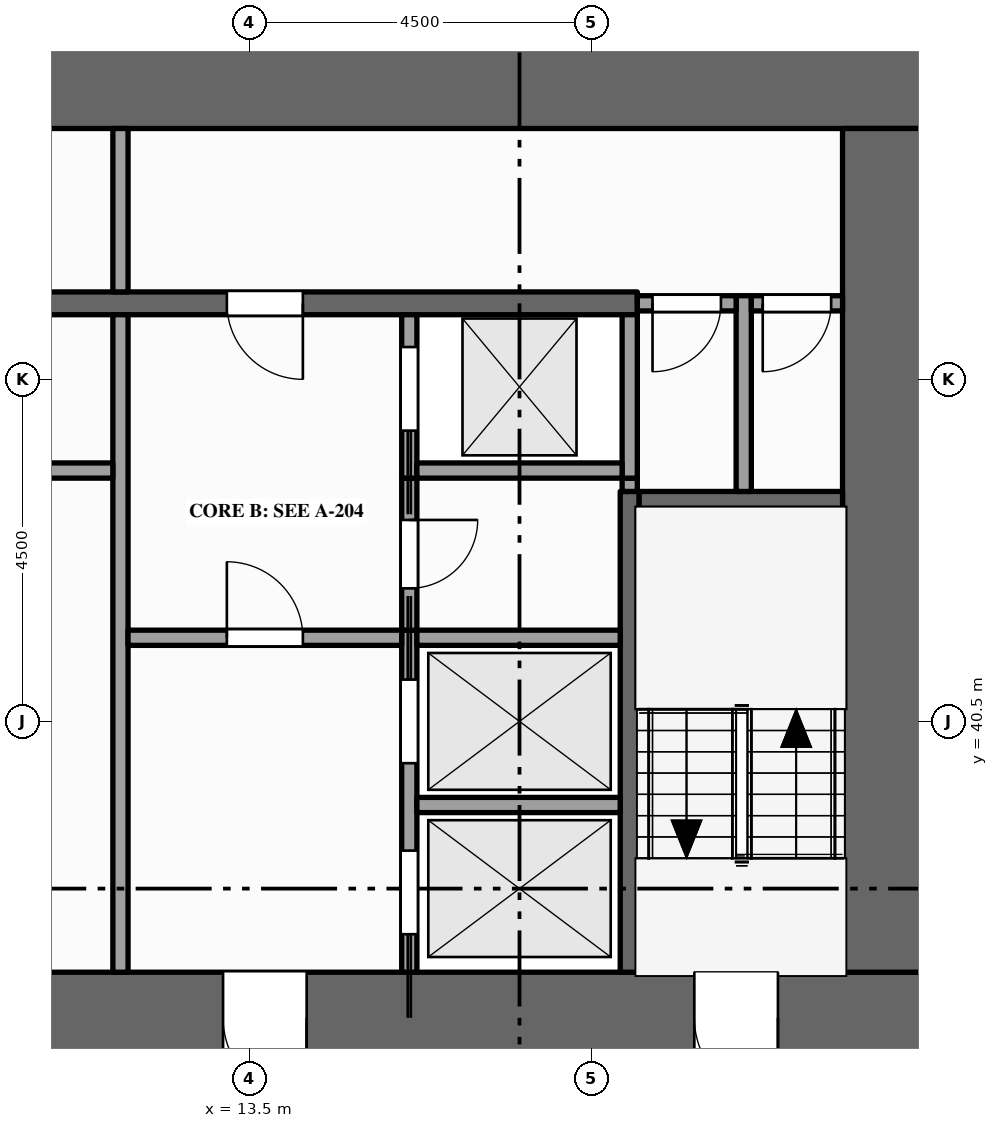
"""IFC4 building model, lengths in metres.
Left out: names, types, materials, properties, quantities, classifications, styles, units other than length and angle.
Written with IfcOpenShell. Run it as: python <this file> out.ifc"""

import sys

from ifc_helpers import new_model, si_unit, direction, frame, frame_2d, origin, place, context, subcontext, project, spatial, rectangle, extrude, element, fill, save


model = new_model("IFC4")
c1 = context("Model", 3, precision=1e-05, world=origin(), true_north=direction((0.0, 1.0)))
c2 = subcontext(c1, "Body", "Model", "MODEL_VIEW")
j1 = project(units=[si_unit("LENGTHUNIT", "METRE"), si_unit("PLANEANGLEUNIT", "RADIAN")], contexts=[c1])
p1 = place(None, origin())
s1 = spatial("IfcSite", under=j1, at=p1, CompositionType="ELEMENT")
p2 = place(p1, origin())
s2 = spatial("IfcBuilding", under=s1, at=p2, CompositionType="ELEMENT")
p3 = place(p2, frame((0.0, 0.0, 19.0)))
s3 = spatial("IfcBuildingStorey", under=s2, at=p3, CompositionType="ELEMENT", Elevation=19.0)
p4 = place(p3, frame((0.0, 36.6, -0.15), z_axis=(0.0, 0.0, 1.0), x_axis=(1.0, 0.0, 0.0)))
e1 = element("IfcWall", 1, at=p4, inside=s3, PredefinedType="SHEAR", context=c2, shape_type="SweptSolid", body=[
    extrude(rectangle(XDim=22.5, YDim=1.2, at=frame_2d((11.25, 0.0))), origin(), (0.0, 0.0, 1.0), 5.0),
])
p5 = place(p4, frame((7.1, 0.0, 0.15)))
e2 = element("IfcOpeningElement", 2, at=p5, cuts=e1, PredefinedType="OPENING", context=c2, shape_type="SweptSolid", body=[
    extrude(rectangle(XDim=1.8, YDim=2.1, at=frame_2d((0.9, 1.05))), frame((0.0, 0.61, 0.0), z_axis=(0.0, -1.0, 0.0), x_axis=(1.0, 0.0, 0.0)), (0.0, 0.0, 1.0), 1.22),
])
p6 = place(p4, frame((13.15, 0.0, 0.15)))
e3 = element("IfcOpeningElement", 3, at=p6, cuts=e1, PredefinedType="OPENING", context=c2, shape_type="SweptSolid", body=[
    extrude(rectangle(XDim=1.1, YDim=2.1, at=frame_2d((0.55, 1.05))), frame((0.0, 0.61, 0.0), z_axis=(0.0, -1.0, 0.0), x_axis=(1.0, 0.0, 0.0)), (0.0, 0.0, 1.0), 1.22),
])
p7 = place(p4, frame((2.15, 0.0, 0.15)))
e4 = element("IfcOpeningElement", 4, at=p7, cuts=e1, PredefinedType="OPENING", context=c2, shape_type="SweptSolid", body=[
    extrude(rectangle(XDim=1.1, YDim=2.1, at=frame_2d((0.55, 1.05))), frame((0.0, 0.61, 0.0), z_axis=(0.0, -1.0, 0.0), x_axis=(1.0, 0.0, 0.0)), (0.0, 0.0, 1.0), 1.22),
])
p8 = place(p4, frame((19.35, 0.0, 0.15)))
e5 = element("IfcOpeningElement", 5, at=p8, cuts=e1, PredefinedType="OPENING", context=c2, shape_type="SweptSolid", body=[
    extrude(rectangle(XDim=1.1, YDim=2.1, at=frame_2d((0.55, 1.05))), frame((0.0, 0.61, 0.0), z_axis=(0.0, -1.0, 0.0), x_axis=(1.0, 0.0, 0.0)), (0.0, 0.0, 1.0), 1.22),
])
p9 = place(p3, frame((0.0, 48.9, -0.15), z_axis=(0.0, 0.0, 1.0), x_axis=(1.0, 0.0, 0.0)))
e6 = element("IfcWall", 6, at=p9, inside=s3, PredefinedType="SHEAR", context=c2, shape_type="SweptSolid", body=[
    extrude(rectangle(XDim=22.5, YDim=1.2, at=frame_2d((11.25, 0.0))), origin(), (0.0, 0.0, 1.0), 5.0),
])
p10 = place(p3, frame((21.9, 37.2, -0.15), z_axis=(0.0, 0.0, 1.0), x_axis=(0.0, 1.0, 0.0)))
e7 = element("IfcWall", 7, at=p10, inside=s3, PredefinedType="SHEAR", context=c2, shape_type="SweptSolid", body=[
    extrude(rectangle(XDim=11.1, YDim=1.2, at=frame_2d((5.55, 0.0))), origin(), (0.0, 0.0, 1.0), 5.0),
])
p11 = place(p3, frame((11.8, 37.2, 0.0), z_axis=(0.0, 0.0, 1.0), x_axis=(0.0, 1.0, 0.0)))
e8 = element("IfcWall", 8, at=p11, inside=s3, PredefinedType="PARTITIONING", context=c2, shape_type="SweptSolid", body=[
    extrude(rectangle(XDim=8.65, YDim=0.2, at=frame_2d((4.325, 0.0))), origin(), (0.0, 0.0, 1.0), 4.75),
])
p12 = place(p3, frame((11.8, 46.15, 0.0), z_axis=(0.0, 0.0, 1.0), x_axis=(0.0, 1.0, 0.0)))
e9 = element("IfcWall", 9, at=p12, inside=s3, PredefinedType="PARTITIONING", context=c2, shape_type="SweptSolid", body=[
    extrude(rectangle(XDim=2.15, YDim=0.2, at=frame_2d((1.075, 0.0))), origin(), (0.0, 0.0, 1.0), 4.75),
])
p13 = place(p3, frame((15.6, 37.2, 0.0), z_axis=(0.0, 0.0, 1.0), x_axis=(0.0, 1.0, 0.0)))
e10 = element("IfcWall", 10, at=p13, inside=s3, PredefinedType="SOLIDWALL", context=c2, shape_type="SweptSolid", body=[
    extrude(rectangle(XDim=4.5, YDim=0.2, at=frame_2d((2.25, 0.0))), origin(), (0.0, 0.0, 1.0), 4.75),
])
p14 = place(p13, frame((0.5, 0.0, 0.012)))
e11 = element("IfcOpeningElement", 11, at=p14, cuts=e10, PredefinedType="OPENING", context=c2, shape_type="SweptSolid", body=[
    extrude(rectangle(XDim=1.1, YDim=2.1, at=frame_2d((0.55, 1.05))), frame((0.0, 0.11, 0.0), z_axis=(0.0, -1.0, 0.0), x_axis=(1.0, 0.0, 0.0)), (0.0, 0.0, 1.0), 0.22),
])
p15 = place(p13, frame((2.75, 0.0, 0.012)))
e12 = element("IfcOpeningElement", 12, at=p15, cuts=e10, PredefinedType="OPENING", context=c2, shape_type="SweptSolid", body=[
    extrude(rectangle(XDim=1.1, YDim=2.1, at=frame_2d((0.55, 1.05))), frame((0.0, 0.11, 0.0), z_axis=(0.0, -1.0, 0.0), x_axis=(1.0, 0.0, 0.0)), (0.0, 0.0, 1.0), 0.22),
])
p16 = place(p3, frame((15.6, 41.7, 0.0), z_axis=(0.0, 0.0, 1.0), x_axis=(0.0, 1.0, 0.0)))
e13 = element("IfcWall", 13, at=p16, inside=s3, PredefinedType="PARTITIONING", context=c2, shape_type="SweptSolid", body=[
    extrude(rectangle(XDim=2.0, YDim=0.2, at=frame_2d((1.0, 0.0))), origin(), (0.0, 0.0, 1.0), 4.75),
])
p17 = place(p16, frame((0.55, 0.0, 0.0)))
e14 = element("IfcOpeningElement", 14, at=p17, cuts=e13, PredefinedType="OPENING", context=c2, shape_type="SweptSolid", body=[
    extrude(rectangle(XDim=0.9, YDim=2.1, at=frame_2d((0.45, 1.05))), frame((0.0, 0.11, 0.0), z_axis=(0.0, -1.0, 0.0), x_axis=(1.0, 0.0, 0.0)), (0.0, 0.0, 1.0), 0.22),
])
p18 = place(p3, frame((15.6, 43.7, 0.0), z_axis=(0.0, 0.0, 1.0), x_axis=(0.0, 1.0, 0.0)))
e15 = element("IfcWall", 15, at=p18, inside=s3, PredefinedType="SOLIDWALL", context=c2, shape_type="SweptSolid", body=[
    extrude(rectangle(XDim=2.15, YDim=0.2, at=frame_2d((1.075, 0.0))), origin(), (0.0, 0.0, 1.0), 4.75),
])
p19 = place(p18, frame((0.625, 0.0, 0.012)))
e16 = element("IfcOpeningElement", 16, at=p19, cuts=e15, PredefinedType="OPENING", context=c2, shape_type="SweptSolid", body=[
    extrude(rectangle(XDim=1.1, YDim=2.1, at=frame_2d((0.55, 1.05))), frame((0.0, 0.11, 0.0), z_axis=(0.0, -1.0, 0.0), x_axis=(1.0, 0.0, 0.0)), (0.0, 0.0, 1.0), 0.22),
])
p20 = place(p3, frame((18.5, 37.2, 0.0), z_axis=(0.0, 0.0, 1.0), x_axis=(0.0, 1.0, 0.0)))
e17 = element("IfcWall", 17, at=p20, inside=s3, PredefinedType="SHEAR", context=c2, shape_type="SweptSolid", body=[
    extrude(rectangle(XDim=6.325, YDim=0.25, at=frame_2d((3.163, 0.0))), origin(), (0.0, 0.0, 1.0), 4.75),
])
p21 = place(p3, frame((18.5, 43.525, 0.0), z_axis=(0.0, 0.0, 1.0), x_axis=(0.0, 1.0, 0.0)))
e18 = element("IfcWall", 18, at=p21, inside=s3, PredefinedType="PARTITIONING", context=c2, shape_type="SweptSolid", body=[
    extrude(rectangle(XDim=0.175, YDim=0.2, at=frame_2d((0.087, 0.0))), origin(), (0.0, 0.0, 1.0), 4.75),
])
p22 = place(p3, frame((18.5, 43.7, 0.0), z_axis=(0.0, 0.0, 1.0), x_axis=(0.0, 1.0, 0.0)))
e19 = element("IfcWall", 19, at=p22, inside=s3, PredefinedType="SOLIDWALL", context=c2, shape_type="SweptSolid", body=[
    extrude(rectangle(XDim=2.15, YDim=0.2, at=frame_2d((1.075, 0.0))), origin(), (0.0, 0.0, 1.0), 4.75),
])
p23 = place(p3, frame((20.0, 43.525, 0.0), z_axis=(0.0, 0.0, 1.0), x_axis=(0.0, 1.0, 0.0)))
e20 = element("IfcWall", 20, at=p23, inside=s3, PredefinedType="PARTITIONING", context=c2, shape_type="SweptSolid", body=[
    extrude(rectangle(XDim=2.575, YDim=0.2, at=frame_2d((1.288, 0.0))), origin(), (0.0, 0.0, 1.0), 4.75),
])
p24 = place(p3, frame((15.7, 39.4, 0.0), z_axis=(0.0, 0.0, 1.0), x_axis=(1.0, 0.0, 0.0)))
e21 = element("IfcWall", 21, at=p24, inside=s3, PredefinedType="SOLIDWALL", context=c2, shape_type="SweptSolid", body=[
    extrude(rectangle(XDim=2.675, YDim=0.2, at=frame_2d((1.337, 0.0))), origin(), (0.0, 0.0, 1.0), 4.75),
])
p25 = place(p3, frame((11.9, 41.6, 0.0), z_axis=(0.0, 0.0, 1.0), x_axis=(1.0, 0.0, 0.0)))
e22 = element("IfcWall", 22, at=p25, inside=s3, PredefinedType="PARTITIONING", context=c2, shape_type="SweptSolid", body=[
    extrude(rectangle(XDim=3.6, YDim=0.2, at=frame_2d((1.8, 0.0))), origin(), (0.0, 0.0, 1.0), 4.75),
])
p26 = place(p25, frame((1.3, 0.0, 0.0)))
e23 = element("IfcOpeningElement", 23, at=p26, cuts=e22, PredefinedType="OPENING", context=c2, shape_type="SweptSolid", body=[
    extrude(rectangle(XDim=1.0, YDim=2.1, at=frame_2d((0.5, 1.05))), frame((0.0, 0.11, 0.0), z_axis=(0.0, -1.0, 0.0), x_axis=(1.0, 0.0, 0.0)), (0.0, 0.0, 1.0), 0.22),
])
p27 = place(p3, frame((15.7, 41.6, 0.0), z_axis=(0.0, 0.0, 1.0), x_axis=(1.0, 0.0, 0.0)))
e24 = element("IfcWall", 24, at=p27, inside=s3, PredefinedType="SOLIDWALL", context=c2, shape_type="SweptSolid", body=[
    extrude(rectangle(XDim=2.675, YDim=0.2, at=frame_2d((1.337, 0.0))), origin(), (0.0, 0.0, 1.0), 4.75),
])
p28 = place(p3, frame((18.625, 43.4, 0.0), z_axis=(0.0, 0.0, 1.0), x_axis=(1.0, 0.0, 0.0)))
e25 = element("IfcWall", 25, at=p28, inside=s3, PredefinedType="SHEAR", context=c2, shape_type="SweptSolid", body=[
    extrude(rectangle(XDim=2.675, YDim=0.25, at=frame_2d((1.337, 0.0))), origin(), (0.0, 0.0, 1.0), 4.75),
])
p29 = place(p3, frame((9.5, 43.8, 0.0), z_axis=(0.0, 0.0, 1.0), x_axis=(1.0, 0.0, 0.0)))
e26 = element("IfcWall", 26, at=p29, inside=s3, PredefinedType="PARTITIONING", context=c2, shape_type="SweptSolid", body=[
    extrude(rectangle(XDim=2.2, YDim=0.2, at=frame_2d((1.1, 0.0))), origin(), (0.0, 0.0, 1.0), 4.75),
])
p30 = place(p3, frame((15.7, 43.8, 0.0), z_axis=(0.0, 0.0, 1.0), x_axis=(1.0, 0.0, 0.0)))
e27 = element("IfcWall", 27, at=p30, inside=s3, PredefinedType="SOLIDWALL", context=c2, shape_type="SweptSolid", body=[
    extrude(rectangle(XDim=2.7, YDim=0.2, at=frame_2d((1.35, 0.0))), origin(), (0.0, 0.0, 1.0), 4.75),
])
p31 = place(p3, frame((4.1, 46.0, 0.0), z_axis=(0.0, 0.0, 1.0), x_axis=(1.0, 0.0, 0.0)))
e28 = element("IfcWall", 28, at=p31, inside=s3, PredefinedType="SHEAR", context=c2, shape_type="SweptSolid", body=[
    extrude(rectangle(XDim=14.5, YDim=0.3, at=frame_2d((7.25, 0.0))), origin(), (0.0, 0.0, 1.0), 4.75),
])
p32 = place(p31, frame((3.4, 0.0, 0.0)))
e29 = element("IfcOpeningElement", 29, at=p32, cuts=e28, PredefinedType="OPENING", context=c2, shape_type="SweptSolid", body=[
    extrude(rectangle(XDim=1.0, YDim=2.1, at=frame_2d((0.5, 1.05))), frame((0.0, 0.16, 0.0), z_axis=(0.0, -1.0, 0.0), x_axis=(1.0, 0.0, 0.0)), (0.0, 0.0, 1.0), 0.32),
])
p33 = place(p31, frame((9.1, 0.0, 0.0)))
e30 = element("IfcOpeningElement", 30, at=p33, cuts=e28, PredefinedType="OPENING", context=c2, shape_type="SweptSolid", body=[
    extrude(rectangle(XDim=1.0, YDim=2.1, at=frame_2d((0.5, 1.05))), frame((0.0, 0.16, 0.0), z_axis=(0.0, -1.0, 0.0), x_axis=(1.0, 0.0, 0.0)), (0.0, 0.0, 1.0), 0.32),
])
p34 = place(p3, frame((18.6, 46.0, 0.0), z_axis=(0.0, 0.0, 1.0), x_axis=(1.0, 0.0, 0.0)))
e31 = element("IfcWall", 31, at=p34, inside=s3, PredefinedType="PARTITIONING", context=c2, shape_type="SweptSolid", body=[
    extrude(rectangle(XDim=1.3, YDim=0.2, at=frame_2d((0.65, 0.0))), origin(), (0.0, 0.0, 1.0), 4.75),
])
p35 = place(p34, frame((0.2, 0.0, 0.0)))
e32 = element("IfcOpeningElement", 32, at=p35, cuts=e31, PredefinedType="OPENING", context=c2, shape_type="SweptSolid", body=[
    extrude(rectangle(XDim=0.9, YDim=2.1, at=frame_2d((0.45, 1.05))), frame((0.0, 0.11, 0.0), z_axis=(0.0, -1.0, 0.0), x_axis=(1.0, 0.0, 0.0)), (0.0, 0.0, 1.0), 0.22),
])
p36 = place(p3, frame((20.1, 46.0, 0.0), z_axis=(0.0, 0.0, 1.0), x_axis=(1.0, 0.0, 0.0)))
e33 = element("IfcWall", 33, at=p36, inside=s3, PredefinedType="PARTITIONING", context=c2, shape_type="SweptSolid", body=[
    extrude(rectangle(XDim=1.2, YDim=0.2, at=frame_2d((0.6, 0.0))), origin(), (0.0, 0.0, 1.0), 4.75),
])
p37 = place(p36, frame((0.15, 0.0, 0.0)))
e34 = element("IfcOpeningElement", 34, at=p37, cuts=e33, PredefinedType="OPENING", context=c2, shape_type="SweptSolid", body=[
    extrude(rectangle(XDim=0.9, YDim=2.1, at=frame_2d((0.45, 1.05))), frame((0.0, 0.11, 0.0), z_axis=(0.0, -1.0, 0.0), x_axis=(1.0, 0.0, 0.0)), (0.0, 0.0, 1.0), 0.22),
])
p38 = place(p14, origin())
e35 = element("IfcDoor", 35, at=p38, inside=s3, OperationType="SLIDING_TO_LEFT", PredefinedType="DOOR", context=c2, shape_type="SweptSolid", body=[
    extrude(rectangle(XDim=1.1, YDim=2.1, at=frame_2d((0.55, 1.05))), frame((0.0, 0.025, 0.0), z_axis=(0.0, -1.0, 0.0), x_axis=(1.0, 0.0, 0.0)), (0.0, 0.0, 1.0), 0.05),
])
fill(e11, e35)
p39 = place(p15, origin())
e36 = element("IfcDoor", 36, at=p39, inside=s3, OperationType="SLIDING_TO_RIGHT", PredefinedType="DOOR", context=c2, shape_type="SweptSolid", body=[
    extrude(rectangle(XDim=1.1, YDim=2.1, at=frame_2d((0.55, 1.05))), frame((0.0, 0.025, 0.0), z_axis=(0.0, -1.0, 0.0), x_axis=(1.0, 0.0, 0.0)), (0.0, 0.0, 1.0), 0.05),
])
fill(e12, e36)
p40 = place(p19, origin())
e37 = element("IfcDoor", 37, at=p40, inside=s3, OperationType="SLIDING_TO_LEFT", PredefinedType="DOOR", context=c2, shape_type="SweptSolid", body=[
    extrude(rectangle(XDim=1.1, YDim=2.1, at=frame_2d((0.55, 1.05))), frame((0.0, 0.025, 0.0), z_axis=(0.0, -1.0, 0.0), x_axis=(1.0, 0.0, 0.0)), (0.0, 0.0, 1.0), 0.05),
])
fill(e16, e37)
p41 = place(p6, origin())
e38 = element("IfcDoor", 38, at=p41, inside=s3, OperationType="SINGLE_SWING_RIGHT", PredefinedType="DOOR", context=c2, shape_type="SweptSolid", body=[
    extrude(rectangle(XDim=1.1, YDim=2.1, at=frame_2d((0.55, 1.05))), frame((0.0, 0.025, 0.0), z_axis=(0.0, -1.0, 0.0), x_axis=(1.0, 0.0, 0.0)), (0.0, 0.0, 1.0), 0.05),
])
fill(e3, e38)
p42 = place(p26, origin())
e39 = element("IfcDoor", 39, at=p42, inside=s3, OperationType="SINGLE_SWING_LEFT", PredefinedType="DOOR", context=c2, shape_type="SweptSolid", body=[
    extrude(rectangle(XDim=1.0, YDim=2.1, at=frame_2d((0.5, 1.05))), frame((0.0, 0.025, 0.0), z_axis=(0.0, -1.0, 0.0), x_axis=(1.0, 0.0, 0.0)), (0.0, 0.0, 1.0), 0.05),
])
fill(e23, e39)
p43 = place(p33, origin())
e40 = element("IfcDoor", 40, at=p43, inside=s3, OperationType="SINGLE_SWING_RIGHT", PredefinedType="DOOR", context=c2, shape_type="SweptSolid", body=[
    extrude(rectangle(XDim=1.0, YDim=2.1, at=frame_2d((0.5, 1.05))), frame((0.0, 0.025, 0.0), z_axis=(0.0, -1.0, 0.0), x_axis=(1.0, 0.0, 0.0)), (0.0, 0.0, 1.0), 0.05),
])
fill(e30, e40)
p44 = place(p8, origin())
e41 = element("IfcDoor", 41, at=p44, inside=s3, OperationType="SINGLE_SWING_RIGHT", PredefinedType="DOOR", context=c2, shape_type="SweptSolid", body=[
    extrude(rectangle(XDim=1.1, YDim=2.1, at=frame_2d((0.55, 1.05))), frame((0.0, 0.025, 0.0), z_axis=(0.0, -1.0, 0.0), x_axis=(1.0, 0.0, 0.0)), (0.0, 0.0, 1.0), 0.05),
])
fill(e5, e41)
p45 = place(p35, origin())
e42 = element("IfcDoor", 42, at=p45, inside=s3, OperationType="SINGLE_SWING_LEFT", PredefinedType="DOOR", context=c2, shape_type="SweptSolid", body=[
    extrude(rectangle(XDim=0.9, YDim=2.1, at=frame_2d((0.45, 1.05))), frame((0.0, 0.025, 0.0), z_axis=(0.0, -1.0, 0.0), x_axis=(1.0, 0.0, 0.0)), (0.0, 0.0, 1.0), 0.05),
])
fill(e32, e42)
p46 = place(p37, origin())
e43 = element("IfcDoor", 43, at=p46, inside=s3, OperationType="SINGLE_SWING_LEFT", PredefinedType="DOOR", context=c2, shape_type="SweptSolid", body=[
    extrude(rectangle(XDim=0.9, YDim=2.1, at=frame_2d((0.45, 1.05))), frame((0.0, 0.025, 0.0), z_axis=(0.0, -1.0, 0.0), x_axis=(1.0, 0.0, 0.0)), (0.0, 0.0, 1.0), 0.05),
])
fill(e34, e43)
p47 = place(p17, origin())
e44 = element("IfcDoor", 44, at=p47, inside=s3, OperationType="SINGLE_SWING_RIGHT", PredefinedType="DOOR", context=c2, shape_type="SweptSolid", body=[
    extrude(rectangle(XDim=0.9, YDim=2.1, at=frame_2d((0.45, 1.05))), frame((0.0, 0.025, 0.0), z_axis=(0.0, -1.0, 0.0), x_axis=(1.0, 0.0, 0.0)), (0.0, 0.0, 1.0), 0.05),
])
fill(e14, e44)
save(model, sys.argv[1])
